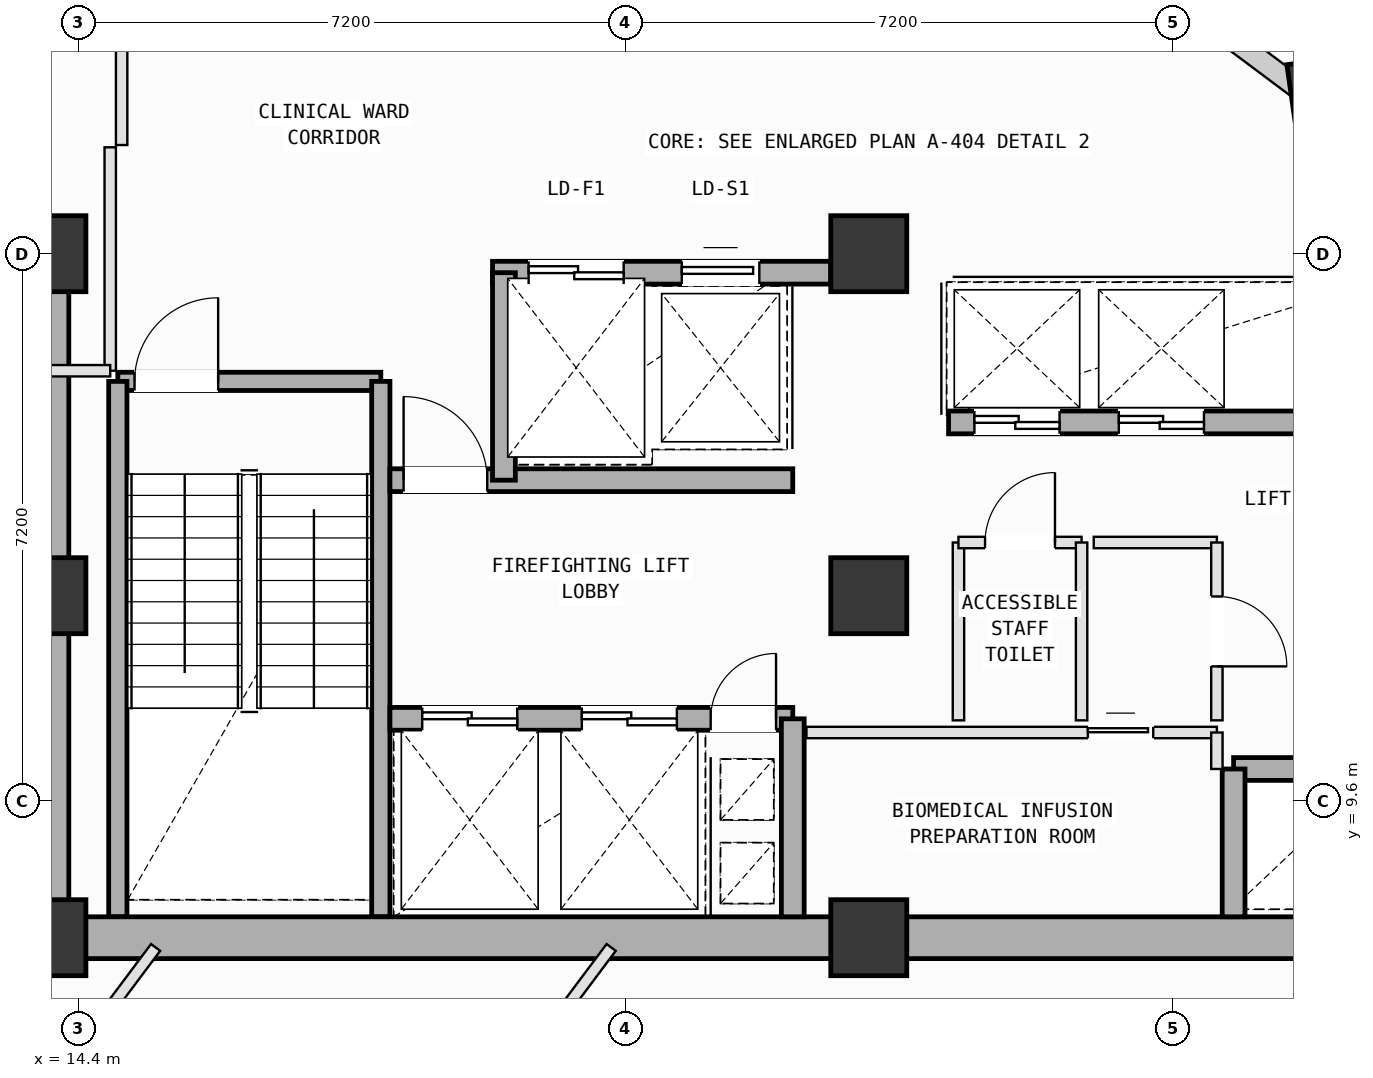
"""IFC4 building model, lengths in metres.
Left out: names, types, materials, properties, quantities, classifications, styles, units other than length and angle.
Written with IfcOpenShell. Run it as: python <this file> out.ifc"""

import sys

from ifc_helpers import new_model, si_unit, direction, frame, frame_2d, origin, origin_2d, place, context, subcontext, project, spatial, rectangle, extrude, element, fill, save


model = new_model("IFC4")
c1 = context("Model", 3, precision=1e-05, world=origin(), true_north=direction((0.0, 1.0)))
c2 = subcontext(c1, "Body", "Model", "MODEL_VIEW")
j1 = project(units=[si_unit("LENGTHUNIT", "METRE"), si_unit("PLANEANGLEUNIT", "RADIAN")], contexts=[c1])
p1 = place(None, origin())
s1 = spatial("IfcSite", under=j1, at=p1, CompositionType="ELEMENT")
p2 = place(p1, origin())
s2 = spatial("IfcBuilding", under=s1, at=p2, CompositionType="ELEMENT")
p3 = place(p2, frame((0.0, 0.0, 251.2)))
s3 = spatial("IfcBuildingStorey", under=s2, at=p3, CompositionType="ELEMENT", Elevation=251.2)
for number, where, z_axis, x_axis in (
    (1, (14.0, 7.8, 0.0), (0.0, 0.0, 1.0), (1.0, 0.0, 0.0)),
    (2, (14.0, 12.3, 0.0), (0.0, 0.0, 1.0), (1.0, 0.0, 0.0)),
    (3, (14.0, 16.8, 0.0), (0.0, 0.0, 1.0), (1.0, 0.0, 0.0)),
    (4, (24.8, 7.8, 0.0), (0.0, 0.0, 1.0), (1.0, 0.0, 0.0)),
    (5, (24.8, 12.3, 0.0), (0.0, 0.0, 1.0), (1.0, 0.0, 0.0)),
    (6, (24.8, 16.8, 0.0), (0.0, 0.0, 1.0), (1.0, 0.0, 0.0)),
):
    element("IfcColumn", number, at=place(p3, frame(where, z_axis=z_axis, x_axis=x_axis)), inside=s3, PredefinedType="COLUMN", context=c2, shape_type="SweptSolid", body=[
        extrude(rectangle(XDim=1.0, YDim=1.0, at=origin_2d()), origin(), (0.0, 0.0, 1.0), 4.0),
    ])
p4 = place(p3, frame((30.757, 18.747, 0.002), z_axis=(0.025220894117, -0.011602832645, 0.999614566108), x_axis=(-0.958449756783, 0.283934892623, 0.027477999826)))
e7 = element("IfcColumn", 7, at=p4, inside=s3, PredefinedType="COLUMN", context=c2, shape_type="SweptSolid", body=[
    extrude(rectangle(XDim=1.2, YDim=0.75, at=origin_2d()), origin(), (0.0, 0.0, 1.0), 3.998),
])
p5 = place(p3, frame((24.911, 23.12, 0.0), z_axis=(0.0, 0.0, 1.0), x_axis=(0.800736238288, -0.599017092154, 0.0)))
e8 = element("IfcWall", 8, at=p5, inside=s3, PredefinedType="SOLIDWALL", context=c2, shape_type="SweptSolid", body=[
    extrude(rectangle(XDim=6.958, YDim=0.28, at=frame_2d((3.479, 0.0))), origin(), (0.0, 0.0, 1.0), 3.165),
])
p6 = place(p3, frame((15.46, 4.09, 0.0), z_axis=(0.0, 0.0, 1.0), x_axis=(-0.800744184448, 0.599006469976, 0.0)))
e9 = element("IfcWall", 9, at=p6, inside=s3, PredefinedType="SOLIDWALL", context=c2, shape_type="SweptSolid", body=[
    extrude(rectangle(XDim=5.861, YDim=0.28, at=frame_2d((2.93, 0.0))), origin(), (0.0, 0.0, 1.0), 3.245),
])
p7 = place(p6, frame((3.604, 0.0, 0.75)))
e10 = element("IfcOpeningElement", 10, at=p7, cuts=e9, PredefinedType="OPENING", context=c2, shape_type="SweptSolid", body=[
    extrude(rectangle(XDim=1.2, YDim=1.75, at=frame_2d((0.6, 0.875))), frame((0.0, 0.15, 0.0), z_axis=(0.0, -1.0, 0.0), x_axis=(1.0, 0.0, 0.0)), (0.0, 0.0, 1.0), 0.3),
])
p8 = place(p3, frame((14.92, 15.12, 0.0), z_axis=(0.0, 0.0, 1.0), x_axis=(1.0, 0.0, 0.0)))
e11 = element("IfcWall", 11, at=p8, inside=s3, PredefinedType="SOLIDWALL", context=c2, shape_type="SweptSolid", body=[
    extrude(rectangle(XDim=3.46, YDim=0.24, at=frame_2d((1.73, 0.0))), origin(), (0.0, 0.0, 1.0), 3.78),
])
p9 = place(p8, frame((0.22, 0.0, 0.0)))
e12 = element("IfcOpeningElement", 12, at=p9, cuts=e11, PredefinedType="OPENING", context=c2, shape_type="SweptSolid", body=[
    extrude(rectangle(XDim=1.1, YDim=2.15, at=frame_2d((0.55, 1.075))), frame((0.0, 0.13, 0.0), z_axis=(0.0, -1.0, 0.0), x_axis=(1.0, 0.0, 0.0)), (0.0, 0.0, 1.0), 0.26),
])
for number, where, z_axis, x_axis in (
    (13, (18.38, 15.12, 0.0), (0.0, 0.0, 1.0), (0.0, -1.0, 0.0)),
    (14, (14.92, 8.075, 0.0), (0.0, 0.0, 1.0), (0.0, 1.0, 0.0)),
):
    element("IfcWall", number, at=place(p3, frame(where, z_axis=z_axis, x_axis=x_axis)), inside=s3, PredefinedType="SOLIDWALL", context=c2, shape_type="SweptSolid", body=[
        extrude(rectangle(XDim=7.045, YDim=0.24, at=frame_2d((3.522, 0.0))), origin(), (0.0, 0.0, 1.0), 3.78),
    ])
for number, where, z_axis, x_axis in (
    (15, (14.0, 7.8, 0.0), (0.0, 0.0, 1.0), (1.0, 0.0, 0.0)),
    (16, (24.8, 7.8, 0.0), (0.0, 0.0, 1.0), (1.0, 0.0, 0.0)),
):
    element("IfcWall", number, at=place(p3, frame(where, z_axis=z_axis, x_axis=x_axis)), inside=s3, PredefinedType="SHEAR", context=c2, shape_type="SweptSolid", body=[
        extrude(rectangle(XDim=10.8, YDim=0.55, at=frame_2d((5.4, 0.0))), origin(), (0.0, 0.0, 1.0), 3.78),
    ])
p10 = place(p3, frame((14.0, 16.8, 0.0), z_axis=(0.0, 0.0, 1.0), x_axis=(0.0, -1.0, 0.0)))
e17 = element("IfcWall", 17, at=p10, inside=s3, PredefinedType="SHEAR", context=c2, shape_type="SweptSolid", body=[
    extrude(rectangle(XDim=9.0, YDim=0.55, at=frame_2d((4.5, 0.0))), origin(), (0.0, 0.0, 1.0), 3.78),
])
p11 = place(p3, frame((19.85, 16.55, 0.0), z_axis=(0.0, 0.0, 1.0), x_axis=(1.0, 0.0, 0.0)))
e18 = element("IfcWall", 18, at=p11, inside=s3, PredefinedType="SOLIDWALL", context=c2, shape_type="SweptSolid", body=[
    extrude(rectangle(XDim=4.45, YDim=0.3, at=frame_2d((2.225, 0.0))), origin(), (0.0, 0.0, 1.0), 3.78),
])
p12 = place(p11, frame((0.475, 0.0, 0.0)))
e19 = element("IfcOpeningElement", 19, at=p12, cuts=e18, PredefinedType="OPENING", context=c2, shape_type="SweptSolid", body=[
    extrude(rectangle(XDim=1.25, YDim=2.18, at=frame_2d((0.625, 1.09))), frame((0.0, 0.16, 0.0), z_axis=(0.0, -1.0, 0.0), x_axis=(1.0, 0.0, 0.0)), (0.0, 0.0, 1.0), 0.32),
])
p13 = place(p11, frame((2.49, 0.0, 0.0)))
e20 = element("IfcOpeningElement", 20, at=p13, cuts=e18, PredefinedType="OPENING", context=c2, shape_type="SweptSolid", body=[
    extrude(rectangle(XDim=1.02, YDim=2.12, at=frame_2d((0.51, 1.06))), frame((0.0, 0.16, 0.0), z_axis=(0.0, -1.0, 0.0), x_axis=(1.0, 0.0, 0.0)), (0.0, 0.0, 1.0), 0.32),
])
p14 = place(p3, frame((18.5, 10.68, 0.0), z_axis=(0.0, 0.0, 1.0), x_axis=(1.0, 0.0, 0.0)))
e21 = element("IfcWall", 21, at=p14, inside=s3, PredefinedType="SOLIDWALL", context=c2, shape_type="SweptSolid", body=[
    extrude(rectangle(XDim=5.3, YDim=0.3, at=frame_2d((2.65, 0.0))), origin(), (0.0, 0.0, 1.0), 3.78),
])
p15 = place(p14, frame((4.22, 0.0, 0.0)))
e22 = element("IfcOpeningElement", 22, at=p15, cuts=e21, PredefinedType="OPENING", context=c2, shape_type="SweptSolid", body=[
    extrude(rectangle(XDim=0.86, YDim=2.06, at=frame_2d((0.43, 1.03))), frame((0.0, 0.16, 0.0), z_axis=(0.0, -1.0, 0.0), x_axis=(1.0, 0.0, 0.0)), (0.0, 0.0, 1.0), 0.32),
])
p16 = place(p14, frame((0.425, 0.0, 0.0)))
e23 = element("IfcOpeningElement", 23, at=p16, cuts=e21, PredefinedType="OPENING", context=c2, shape_type="SweptSolid", body=[
    extrude(rectangle(XDim=1.25, YDim=2.18, at=frame_2d((0.625, 1.09))), frame((0.0, 0.16, 0.0), z_axis=(0.0, -1.0, 0.0), x_axis=(1.0, 0.0, 0.0)), (0.0, 0.0, 1.0), 0.32),
])
p17 = place(p14, frame((2.525, 0.0, 0.0)))
e24 = element("IfcOpeningElement", 24, at=p17, cuts=e21, PredefinedType="OPENING", context=c2, shape_type="SweptSolid", body=[
    extrude(rectangle(XDim=1.25, YDim=2.18, at=frame_2d((0.625, 1.09))), frame((0.0, 0.16, 0.0), z_axis=(0.0, -1.0, 0.0), x_axis=(1.0, 0.0, 0.0)), (0.0, 0.0, 1.0), 0.32),
])
p18 = place(p3, frame((18.5, 13.82, 0.0), z_axis=(0.0, 0.0, 1.0), x_axis=(1.0, 0.0, 0.0)))
e25 = element("IfcWall", 25, at=p18, inside=s3, PredefinedType="SOLIDWALL", context=c2, shape_type="SweptSolid", body=[
    extrude(rectangle(XDim=5.3, YDim=0.3, at=frame_2d((2.65, 0.0))), origin(), (0.0, 0.0, 1.0), 3.78),
])
p19 = place(p18, frame((0.18, 0.0, 0.0)))
e26 = element("IfcOpeningElement", 26, at=p19, cuts=e25, PredefinedType="OPENING", context=c2, shape_type="SweptSolid", body=[
    extrude(rectangle(XDim=1.1, YDim=2.15, at=frame_2d((0.55, 1.075))), frame((0.0, 0.16, 0.0), z_axis=(0.0, -1.0, 0.0), x_axis=(1.0, 0.0, 0.0)), (0.0, 0.0, 1.0), 0.32),
])
p20 = place(p3, frame((23.8, 8.075, 0.0), z_axis=(0.0, 0.0, 1.0), x_axis=(0.0, 1.0, 0.0)))
e27 = element("IfcWall", 27, at=p20, inside=s3, PredefinedType="SOLIDWALL", context=c2, shape_type="SweptSolid", body=[
    extrude(rectangle(XDim=2.605, YDim=0.3, at=frame_2d((1.302, 0.0))), origin(), (0.0, 0.0, 1.0), 3.78),
])
p21 = place(p3, frame((20.0, 13.82, 0.0), z_axis=(0.0, 0.0, 1.0), x_axis=(0.0, 1.0, 0.0)))
e28 = element("IfcWall", 28, at=p21, inside=s3, PredefinedType="SOLIDWALL", context=c2, shape_type="SweptSolid", body=[
    extrude(rectangle(XDim=2.73, YDim=0.3, at=frame_2d((1.365, 0.0))), origin(), (0.0, 0.0, 1.0), 3.78),
])
p22 = place(p3, frame((29.6, 10.02, 0.0), z_axis=(0.0, 0.0, 1.0), x_axis=(1.0, 0.0, 0.0)))
e29 = element("IfcWall", 29, at=p22, inside=s3, PredefinedType="SOLIDWALL", context=c2, shape_type="SweptSolid", body=[
    extrude(rectangle(XDim=1.7, YDim=0.3, at=frame_2d((0.85, 0.0))), origin(), (0.0, 0.0, 1.0), 3.78),
])
p23 = place(p3, frame((29.6, 8.075, 0.0), z_axis=(0.0, 0.0, 1.0), x_axis=(0.0, 1.0, 0.0)))
e30 = element("IfcWall", 30, at=p23, inside=s3, PredefinedType="SOLIDWALL", context=c2, shape_type="SweptSolid", body=[
    extrude(rectangle(XDim=1.945, YDim=0.3, at=frame_2d((0.973, 0.0))), origin(), (0.0, 0.0, 1.0), 3.78),
])
p24 = place(p3, frame((25.85, 14.58, 0.0), z_axis=(0.0, 0.0, 1.0), x_axis=(1.0, 0.0, 0.0)))
e31 = element("IfcWall", 31, at=p24, inside=s3, PredefinedType="SOLIDWALL", context=c2, shape_type="SweptSolid", body=[
    extrude(rectangle(XDim=5.45, YDim=0.3, at=frame_2d((2.725, 0.0))), origin(), (0.0, 0.0, 1.0), 3.78),
])
p25 = place(p24, frame((0.34, 0.0, 0.0)))
e32 = element("IfcOpeningElement", 32, at=p25, cuts=e31, PredefinedType="OPENING", context=c2, shape_type="SweptSolid", body=[
    extrude(rectangle(XDim=1.12, YDim=2.15, at=frame_2d((0.56, 1.075))), frame((0.0, 0.16, 0.0), z_axis=(0.0, -1.0, 0.0), x_axis=(1.0, 0.0, 0.0)), (0.0, 0.0, 1.0), 0.32),
])
p26 = place(p24, frame((2.24, 0.0, 0.0)))
e33 = element("IfcOpeningElement", 33, at=p26, cuts=e31, PredefinedType="OPENING", context=c2, shape_type="SweptSolid", body=[
    extrude(rectangle(XDim=1.12, YDim=2.15, at=frame_2d((0.56, 1.075))), frame((0.0, 0.16, 0.0), z_axis=(0.0, -1.0, 0.0), x_axis=(1.0, 0.0, 0.0)), (0.0, 0.0, 1.0), 0.32),
])
p27 = place(p3, frame((23.98, 10.5, 0.0), z_axis=(0.0, 0.0, 1.0), x_axis=(1.0, 0.0, 0.0)))
e34 = element("IfcWall", 34, at=p27, inside=s3, PredefinedType="PARTITIONING", context=c2, shape_type="SweptSolid", body=[
    extrude(rectangle(XDim=5.4, YDim=0.15, at=frame_2d((2.7, 0.0))), origin(), (0.0, 0.0, 1.0), 3.78),
])
p28 = place(p27, frame((3.703, 0.0, 0.0)))
e35 = element("IfcOpeningElement", 35, at=p28, cuts=e34, PredefinedType="OPENING", context=c2, shape_type="SweptSolid", body=[
    extrude(rectangle(XDim=0.86, YDim=2.06, at=frame_2d((0.43, 1.03))), frame((0.0, 0.085, 0.0), z_axis=(0.0, -1.0, 0.0), x_axis=(1.0, 0.0, 0.0)), (0.0, 0.0, 1.0), 0.17),
])
p29 = place(p3, frame((29.38, 10.5, 0.0), z_axis=(0.0, 0.0, 1.0), x_axis=(0.0, -1.0, 0.0)))
e36 = element("IfcWall", 36, at=p29, inside=s3, PredefinedType="PARTITIONING", context=c2, shape_type="SweptSolid", body=[
    extrude(rectangle(XDim=0.48, YDim=0.15, at=frame_2d((0.24, 0.0))), origin(), (0.0, 0.0, 1.0), 3.78),
])
p30 = place(p3, frame((25.98, 10.66, 0.0), z_axis=(0.0, 0.0, 1.0), x_axis=(0.0, 1.0, 0.0)))
e37 = element("IfcWall", 37, at=p30, inside=s3, PredefinedType="PARTITIONING", context=c2, shape_type="SweptSolid", body=[
    extrude(rectangle(XDim=2.34, YDim=0.15, at=frame_2d((1.17, 0.0))), origin(), (0.0, 0.0, 1.0), 3.78),
])
p31 = place(p3, frame((25.98, 13.0, 0.0), z_axis=(0.0, 0.0, 1.0), x_axis=(1.0, 0.0, 0.0)))
e38 = element("IfcWall", 38, at=p31, inside=s3, PredefinedType="PARTITIONING", context=c2, shape_type="SweptSolid", body=[
    extrude(rectangle(XDim=1.62, YDim=0.15, at=frame_2d((0.81, 0.0))), origin(), (0.0, 0.0, 1.0), 3.78),
])
p32 = place(p31, frame((0.35, 0.0, 0.0)))
e39 = element("IfcOpeningElement", 39, at=p32, cuts=e38, PredefinedType="OPENING", context=c2, shape_type="SweptSolid", body=[
    extrude(rectangle(XDim=0.92, YDim=2.1, at=frame_2d((0.46, 1.05))), frame((0.0, 0.085, 0.0), z_axis=(0.0, -1.0, 0.0), x_axis=(1.0, 0.0, 0.0)), (0.0, 0.0, 1.0), 0.17),
])
p33 = place(p3, frame((27.6, 13.0, 0.0), z_axis=(0.0, 0.0, 1.0), x_axis=(0.0, -1.0, 0.0)))
e40 = element("IfcWall", 40, at=p33, inside=s3, PredefinedType="PARTITIONING", context=c2, shape_type="SweptSolid", body=[
    extrude(rectangle(XDim=2.34, YDim=0.15, at=frame_2d((1.17, 0.0))), origin(), (0.0, 0.0, 1.0), 3.78),
])
p34 = place(p3, frame((27.76, 13.0, 0.0), z_axis=(0.0, 0.0, 1.0), x_axis=(1.0, 0.0, 0.0)))
e41 = element("IfcWall", 41, at=p34, inside=s3, PredefinedType="PARTITIONING", context=c2, shape_type="SweptSolid", body=[
    extrude(rectangle(XDim=1.62, YDim=0.15, at=frame_2d((0.81, 0.0))), origin(), (0.0, 0.0, 1.0), 3.78),
])
p35 = place(p3, frame((29.38, 13.0, 0.0), z_axis=(0.0, 0.0, 1.0), x_axis=(0.0, -1.0, 0.0)))
e42 = element("IfcWall", 42, at=p35, inside=s3, PredefinedType="PARTITIONING", context=c2, shape_type="SweptSolid", body=[
    extrude(rectangle(XDim=2.34, YDim=0.15, at=frame_2d((1.17, 0.0))), origin(), (0.0, 0.0, 1.0), 3.78),
])
p36 = place(p35, frame((0.71, 0.0, 0.0)))
e43 = element("IfcOpeningElement", 43, at=p36, cuts=e42, PredefinedType="OPENING", context=c2, shape_type="SweptSolid", body=[
    extrude(rectangle(XDim=0.92, YDim=2.1, at=frame_2d((0.46, 1.05))), frame((0.0, 0.085, 0.0), z_axis=(0.0, -1.0, 0.0), x_axis=(1.0, 0.0, 0.0)), (0.0, 0.0, 1.0), 0.17),
])
p37 = place(p3, frame((33.201, 7.672, 0.0), z_axis=(0.0, 0.0, 1.0), x_axis=(-0.5990566524, -0.80070664242, 0.0)))
e44 = element("IfcWall", 44, at=p37, inside=s3, PredefinedType="PARTITIONING", context=c2, shape_type="SweptSolid", body=[
    extrude(rectangle(XDim=13.381, YDim=0.15, at=frame_2d((6.69, 0.0))), origin(), (0.0, 0.0, 1.0), 3.78),
])
p38 = place(p3, frame((18.806, 4.19, 0.0), z_axis=(0.0, 0.0, 1.0), x_axis=(0.599020458163, 0.800733720223, 0.0)))
e45 = element("IfcWall", 45, at=p38, inside=s3, PredefinedType="PARTITIONING", context=c2, shape_type="SweptSolid", body=[
    extrude(rectangle(XDim=4.349, YDim=0.15, at=frame_2d((2.174, 0.0))), origin(), (0.0, 0.0, 1.0), 3.78),
])
p39 = place(p38, frame((1.637, 0.0, 0.0)))
e46 = element("IfcOpeningElement", 46, at=p39, cuts=e45, PredefinedType="OPENING", context=c2, shape_type="SweptSolid", body=[
    extrude(rectangle(XDim=0.86, YDim=2.06, at=frame_2d((0.43, 1.03))), frame((0.0, 0.085, 0.0), z_axis=(0.0, -1.0, 0.0), x_axis=(1.0, 0.0, 0.0)), (0.0, 0.0, 1.0), 0.17),
])
p40 = place(p3, frame((13.782, 5.488, 0.0), z_axis=(0.0, 0.0, 1.0), x_axis=(0.599283876388, 0.800536592231, 0.0)))
e47 = element("IfcWall", 47, at=p40, inside=s3, PredefinedType="PARTITIONING", context=c2, shape_type="SweptSolid", body=[
    extrude(rectangle(XDim=2.728, YDim=0.15, at=frame_2d((1.364, 0.0))), origin(), (0.0, 0.0, 1.0), 3.78),
])
p41 = place(p40, frame((0.302, 0.0, 0.0)))
e48 = element("IfcOpeningElement", 48, at=p41, cuts=e47, PredefinedType="OPENING", context=c2, shape_type="SweptSolid", body=[
    extrude(rectangle(XDim=0.86, YDim=2.06, at=frame_2d((0.43, 1.03))), frame((0.0, 0.085, 0.0), z_axis=(0.0, -1.0, 0.0), x_axis=(1.0, 0.0, 0.0)), (0.0, 0.0, 1.0), 0.17),
])
p42 = place(p3, frame((14.97, 20.55, 0.0), z_axis=(0.0, 0.0, 1.0), x_axis=(0.0, -1.0, 0.0)))
e49 = element("IfcWall", 49, at=p42, inside=s3, PredefinedType="PARTITIONING", context=c2, shape_type="SweptSolid", body=[
    extrude(rectangle(XDim=2.32, YDim=0.15, at=frame_2d((1.16, 0.0))), origin(), (0.0, 0.0, 1.0), 3.78),
])
p43 = place(p3, frame((14.82, 18.2, 0.0), z_axis=(0.0, 0.0, 1.0), x_axis=(0.0, -1.0, 0.0)))
e50 = element("IfcWall", 50, at=p43, inside=s3, PredefinedType="PARTITIONING", context=c2, shape_type="SweptSolid", body=[
    extrude(rectangle(XDim=2.94, YDim=0.15, at=frame_2d((1.47, 0.0))), origin(), (0.0, 0.0, 1.0), 3.78),
])
p44 = place(p3, frame((14.82, 15.26, 0.0), z_axis=(0.0, 0.0, 1.0), x_axis=(-1.0, 0.0, 0.0)))
e51 = element("IfcWall", 51, at=p44, inside=s3, PredefinedType="PARTITIONING", context=c2, shape_type="SweptSolid", body=[
    extrude(rectangle(XDim=1.12, YDim=0.15, at=frame_2d((0.56, 0.0))), origin(), (0.0, 0.0, 1.0), 3.78),
])
p45 = place(p3, frame((6.096, 11.238, 0.0), z_axis=(0.0, 0.0, 1.0), x_axis=(0.598991058124, 0.80075571324, 0.0)))
e52 = element("IfcWall", 52, at=p45, inside=s3, PredefinedType="PARTITIONING", context=c2, shape_type="SweptSolid", body=[
    extrude(rectangle(XDim=13.635, YDim=0.15, at=frame_2d((6.817, 0.0))), origin(), (0.0, 0.0, 1.0), 3.78),
])
p46 = place(p9, origin())
e53 = element("IfcDoor", 53, at=p46, inside=s3, OperationType="SINGLE_SWING_RIGHT", PredefinedType="DOOR", context=c2, shape_type="SweptSolid", body=[
    extrude(rectangle(XDim=1.1, YDim=2.15, at=frame_2d((0.55, 1.075))), frame((0.0, 0.025, 0.0), z_axis=(0.0, -1.0, 0.0), x_axis=(1.0, 0.0, 0.0)), (0.0, 0.0, 1.0), 0.05),
])
fill(e12, e53)
p47 = place(p15, origin())
e54 = element("IfcDoor", 54, at=p47, inside=s3, OperationType="SINGLE_SWING_RIGHT", PredefinedType="DOOR", context=c2, shape_type="SweptSolid", body=[
    extrude(rectangle(XDim=0.86, YDim=2.06, at=frame_2d((0.43, 1.03))), frame((0.0, 0.025, 0.0), z_axis=(0.0, -1.0, 0.0), x_axis=(1.0, 0.0, 0.0)), (0.0, 0.0, 1.0), 0.05),
])
fill(e22, e54)
p48 = place(p19, origin())
e55 = element("IfcDoor", 55, at=p48, inside=s3, OperationType="SINGLE_SWING_LEFT", PredefinedType="DOOR", context=c2, shape_type="SweptSolid", body=[
    extrude(rectangle(XDim=1.1, YDim=2.15, at=frame_2d((0.55, 1.075))), frame((0.0, 0.025, 0.0), z_axis=(0.0, -1.0, 0.0), x_axis=(1.0, 0.0, 0.0)), (0.0, 0.0, 1.0), 0.05),
])
fill(e26, e55)
p49 = place(p16, origin())
e56 = element("IfcDoor", 56, at=p49, inside=s3, OperationType="DOUBLE_DOOR_SLIDING", PredefinedType="DOOR", context=c2, shape_type="SweptSolid", body=[
    extrude(rectangle(XDim=1.25, YDim=2.18, at=frame_2d((0.625, 1.09))), frame((0.0, 0.025, 0.0), z_axis=(0.0, -1.0, 0.0), x_axis=(1.0, 0.0, 0.0)), (0.0, 0.0, 1.0), 0.05),
])
fill(e23, e56)
p50 = place(p17, origin())
e57 = element("IfcDoor", 57, at=p50, inside=s3, OperationType="DOUBLE_DOOR_SLIDING", PredefinedType="DOOR", context=c2, shape_type="SweptSolid", body=[
    extrude(rectangle(XDim=1.25, YDim=2.18, at=frame_2d((0.625, 1.09))), frame((0.0, 0.025, 0.0), z_axis=(0.0, -1.0, 0.0), x_axis=(1.0, 0.0, 0.0)), (0.0, 0.0, 1.0), 0.05),
])
fill(e24, e57)
p51 = place(p25, origin())
e58 = element("IfcDoor", 58, at=p51, inside=s3, OperationType="DOUBLE_DOOR_SLIDING", PredefinedType="DOOR", context=c2, shape_type="SweptSolid", body=[
    extrude(rectangle(XDim=1.12, YDim=2.15, at=frame_2d((0.56, 1.075))), frame((0.0, 0.025, 0.0), z_axis=(0.0, -1.0, 0.0), x_axis=(1.0, 0.0, 0.0)), (0.0, 0.0, 1.0), 0.05),
])
fill(e32, e58)
p52 = place(p26, origin())
e59 = element("IfcDoor", 59, at=p52, inside=s3, OperationType="DOUBLE_DOOR_SLIDING", PredefinedType="DOOR", context=c2, shape_type="SweptSolid", body=[
    extrude(rectangle(XDim=1.12, YDim=2.15, at=frame_2d((0.56, 1.075))), frame((0.0, 0.025, 0.0), z_axis=(0.0, -1.0, 0.0), x_axis=(1.0, 0.0, 0.0)), (0.0, 0.0, 1.0), 0.05),
])
fill(e33, e59)
p53 = place(p12, origin())
e60 = element("IfcDoor", 60, at=p53, inside=s3, OperationType="DOUBLE_DOOR_SLIDING", PredefinedType="DOOR", context=c2, shape_type="SweptSolid", body=[
    extrude(rectangle(XDim=1.25, YDim=2.18, at=frame_2d((0.625, 1.09))), frame((0.0, 0.025, 0.0), z_axis=(0.0, -1.0, 0.0), x_axis=(1.0, 0.0, 0.0)), (0.0, 0.0, 1.0), 0.05),
])
fill(e19, e60)
p54 = place(p13, origin())
e61 = element("IfcDoor", 61, at=p54, inside=s3, OperationType="SLIDING_TO_LEFT", PredefinedType="DOOR", context=c2, shape_type="SweptSolid", body=[
    extrude(rectangle(XDim=1.02, YDim=2.12, at=frame_2d((0.51, 1.06))), frame((0.0, 0.025, 0.0), z_axis=(0.0, -1.0, 0.0), x_axis=(1.0, 0.0, 0.0)), (0.0, 0.0, 1.0), 0.05),
])
fill(e20, e61)
p55 = place(p32, origin())
e62 = element("IfcDoor", 62, at=p55, inside=s3, OperationType="SINGLE_SWING_RIGHT", PredefinedType="DOOR", context=c2, shape_type="SweptSolid", body=[
    extrude(rectangle(XDim=0.92, YDim=2.1, at=frame_2d((0.46, 1.05))), frame((0.0, 0.025, 0.0), z_axis=(0.0, -1.0, 0.0), x_axis=(1.0, 0.0, 0.0)), (0.0, 0.0, 1.0), 0.05),
])
fill(e39, e62)
p56 = place(p36, origin())
e63 = element("IfcDoor", 63, at=p56, inside=s3, OperationType="SINGLE_SWING_RIGHT", PredefinedType="DOOR", context=c2, shape_type="SweptSolid", body=[
    extrude(rectangle(XDim=0.92, YDim=2.1, at=frame_2d((0.46, 1.05))), frame((0.0, 0.025, 0.0), z_axis=(0.0, -1.0, 0.0), x_axis=(1.0, 0.0, 0.0)), (0.0, 0.0, 1.0), 0.05),
])
fill(e43, e63)
p57 = place(p28, origin())
e64 = element("IfcDoor", 64, at=p57, inside=s3, OperationType="SLIDING_TO_LEFT", PredefinedType="DOOR", context=c2, shape_type="SweptSolid", body=[
    extrude(rectangle(XDim=0.86, YDim=2.06, at=frame_2d((0.43, 1.03))), frame((0.0, 0.025, 0.0), z_axis=(0.0, -1.0, 0.0), x_axis=(1.0, 0.0, 0.0)), (0.0, 0.0, 1.0), 0.05),
])
fill(e35, e64)
save(model, sys.argv[1])
